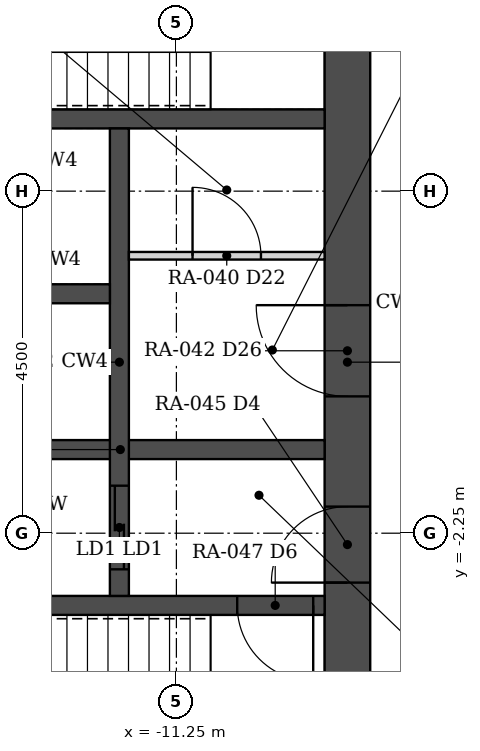
"""IFC4 building model, lengths in metres.
Left out: names, types, materials, properties, quantities, classifications, styles, units other than length and angle.
Written with IfcOpenShell. Run it as: python <this file> out.ifc"""

import sys

from ifc_helpers import new_model, si_unit, direction, frame, frame_2d, origin, place, context, subcontext, project, spatial, rectangle, extrude, element, fill, save


model = new_model("IFC4")
c1 = context("Model", 3, precision=1e-05, world=origin(), true_north=direction((0.0, 1.0)))
c2 = subcontext(c1, "Body", "Model", "MODEL_VIEW")
j1 = project(units=[si_unit("LENGTHUNIT", "METRE"), si_unit("PLANEANGLEUNIT", "RADIAN")], contexts=[c1])
p1 = place(None, origin())
s1 = spatial("IfcSite", under=j1, at=p1, CompositionType="ELEMENT")
p2 = place(p1, origin())
s2 = spatial("IfcBuilding", under=s1, at=p2, CompositionType="ELEMENT")
p3 = place(p2, frame((0.0, 0.0, 30.0)))
s3 = spatial("IfcBuildingStorey", under=s2, at=p3, CompositionType="ELEMENT", Elevation=30.0)
p4 = place(p3, frame((-9.0, -6.45, 0.0), z_axis=(0.0, 0.0, 1.0), x_axis=(0.0, 1.0, 0.0)))
e1 = element("IfcWall", 1, at=p4, inside=s3, PredefinedType="SHEAR", context=c2, shape_type="SweptSolid", body=[
    extrude(rectangle(XDim=12.9, YDim=0.6, at=frame_2d((6.45, 0.0))), origin(), (0.0, 0.0, 1.0), 3.5),
])
p5 = place(p4, frame((3.55, 0.0, 0.0)))
e2 = element("IfcOpeningElement", 2, at=p5, cuts=e1, PredefinedType="OPENING", context=c2, shape_type="SweptSolid", body=[
    extrude(rectangle(XDim=1.0, YDim=2.1, at=frame_2d((0.5, 1.05))), frame((0.0, 0.31, 0.0), z_axis=(0.0, -1.0, 0.0), x_axis=(1.0, 0.0, 0.0)), (0.0, 0.0, 1.0), 0.62),
])
p6 = place(p4, frame((6.0, 0.0, 0.0)))
e3 = element("IfcOpeningElement", 3, at=p6, cuts=e1, PredefinedType="OPENING", context=c2, shape_type="SweptSolid", body=[
    extrude(rectangle(XDim=1.2, YDim=2.1, at=frame_2d((0.6, 1.05))), frame((0.0, 0.31, 0.0), z_axis=(0.0, -1.0, 0.0), x_axis=(1.0, 0.0, 0.0)), (0.0, 0.0, 1.0), 0.62),
])
p7 = place(p4, frame((10.85, 0.0, 0.0)))
e4 = element("IfcOpeningElement", 4, at=p7, cuts=e1, PredefinedType="OPENING", context=c2, shape_type="SweptSolid", body=[
    extrude(rectangle(XDim=1.0, YDim=2.1, at=frame_2d((0.5, 1.05))), frame((0.0, 0.31, 0.0), z_axis=(0.0, -1.0, 0.0), x_axis=(1.0, 0.0, 0.0)), (0.0, 0.0, 1.0), 0.62),
])
p8 = place(p3, frame((-9.3, -3.2, 0.0), z_axis=(0.0, 0.0, 1.0), x_axis=(-1.0, 0.0, 0.0)))
e5 = element("IfcWall", 5, at=p8, inside=s3, PredefinedType="SHEAR", context=c2, shape_type="SweptSolid", body=[
    extrude(rectangle(XDim=8.4, YDim=0.25, at=frame_2d((4.2, 0.0))), origin(), (0.0, 0.0, 1.0), 3.5),
])
p9 = place(p8, frame((0.15, 0.0, 0.0)))
e6 = element("IfcOpeningElement", 6, at=p9, cuts=e5, PredefinedType="OPENING", context=c2, shape_type="SweptSolid", body=[
    extrude(rectangle(XDim=1.0, YDim=2.1, at=frame_2d((0.5, 1.05))), frame((0.0, 0.135, 0.0), z_axis=(0.0, -1.0, 0.0), x_axis=(1.0, 0.0, 0.0)), (0.0, 0.0, 1.0), 0.27),
])
p10 = place(p3, frame((-9.3, 3.2, 0.0), z_axis=(0.0, 0.0, 1.0), x_axis=(-1.0, 0.0, 0.0)))
e7 = element("IfcWall", 7, at=p10, inside=s3, PredefinedType="SHEAR", context=c2, shape_type="SweptSolid", body=[
    extrude(rectangle(XDim=8.4, YDim=0.25, at=frame_2d((4.2, 0.0))), origin(), (0.0, 0.0, 1.0), 3.5),
])
p11 = place(p3, frame((-9.3, -1.15, 0.0), z_axis=(0.0, 0.0, 1.0), x_axis=(-1.0, 0.0, 0.0)))
e8 = element("IfcWall", 8, at=p11, inside=s3, PredefinedType="SHEAR", context=c2, shape_type="SweptSolid", body=[
    extrude(rectangle(XDim=5.375, YDim=0.25, at=frame_2d((2.688, 0.0))), origin(), (0.0, 0.0, 1.0), 3.5),
])
p12 = place(p3, frame((-12.0, -3.075, 0.0), z_axis=(0.0, 0.0, 1.0), x_axis=(0.0, 1.0, 0.0)))
e9 = element("IfcWall", 9, at=p12, inside=s3, PredefinedType="SHEAR", context=c2, shape_type="SweptSolid", body=[
    extrude(rectangle(XDim=6.15, YDim=0.25, at=frame_2d((3.075, 0.0))), origin(), (0.0, 0.0, 1.0), 3.5),
])
p13 = place(p12, frame((0.35, 0.0, 0.0)))
e10 = element("IfcOpeningElement", 10, at=p13, cuts=e9, PredefinedType="OPENING", context=c2, shape_type="SweptSolid", body=[
    extrude(rectangle(XDim=1.1, YDim=2.1, at=frame_2d((0.55, 1.05))), frame((0.0, 0.135, 0.0), z_axis=(0.0, -1.0, 0.0), x_axis=(1.0, 0.0, 0.0)), (0.0, 0.0, 1.0), 0.27),
])
p14 = place(p3, frame((-12.125, 0.9, 0.0), z_axis=(0.0, 0.0, 1.0), x_axis=(-1.0, 0.0, 0.0)))
e11 = element("IfcWall", 11, at=p14, inside=s3, PredefinedType="SHEAR", context=c2, shape_type="SweptSolid", body=[
    extrude(rectangle(XDim=2.55, YDim=0.25, at=frame_2d((1.275, 0.0))), origin(), (0.0, 0.0, 1.0), 3.5),
])
p15 = place(p3, frame((-11.875, 1.4, 0.0), z_axis=(0.0, 0.0, 1.0), x_axis=(1.0, 0.0, 0.0)))
e12 = element("IfcWall", 12, at=p15, inside=s3, PredefinedType="PARTITIONING", context=c2, shape_type="SweptSolid", body=[
    extrude(rectangle(XDim=2.575, YDim=0.1, at=frame_2d((1.288, 0.0))), origin(), (0.0, 0.0, 1.0), 2.373),
])
p16 = place(p15, frame((0.837, 0.0, 0.0)))
e13 = element("IfcOpeningElement", 13, at=p16, cuts=e12, PredefinedType="OPENING", context=c2, shape_type="SweptSolid", body=[
    extrude(rectangle(XDim=0.9, YDim=2.1, at=frame_2d((0.45, 1.05))), frame((0.0, 0.06, 0.0), z_axis=(0.0, -1.0, 0.0), x_axis=(1.0, 0.0, 0.0)), (0.0, 0.0, 1.0), 0.12),
])
p17 = place(p5, origin())
e14 = element("IfcDoor", 14, at=p17, inside=s3, OperationType="SINGLE_SWING_LEFT", PredefinedType="DOOR", context=c2, shape_type="SweptSolid", body=[
    extrude(rectangle(XDim=1.0, YDim=2.1, at=frame_2d((0.5, 1.05))), frame((0.0, 0.025, 0.0), z_axis=(0.0, -1.0, 0.0), x_axis=(1.0, 0.0, 0.0)), (0.0, 0.0, 1.0), 0.05),
])
fill(e2, e14)
p18 = place(p9, origin())
e15 = element("IfcDoor", 15, at=p18, inside=s3, OperationType="SINGLE_SWING_LEFT", PredefinedType="DOOR", context=c2, shape_type="SweptSolid", body=[
    extrude(rectangle(XDim=1.0, YDim=2.1, at=frame_2d((0.5, 1.05))), frame((0.0, 0.025, 0.0), z_axis=(0.0, -1.0, 0.0), x_axis=(1.0, 0.0, 0.0)), (0.0, 0.0, 1.0), 0.05),
])
fill(e6, e15)
p19 = place(p6, origin())
e16 = element("IfcDoor", 16, at=p19, inside=s3, OperationType="SINGLE_SWING_RIGHT", PredefinedType="DOOR", context=c2, shape_type="SweptSolid", body=[
    extrude(rectangle(XDim=1.2, YDim=2.1, at=frame_2d((0.6, 1.05))), frame((0.0, 0.025, 0.0), z_axis=(0.0, -1.0, 0.0), x_axis=(1.0, 0.0, 0.0)), (0.0, 0.0, 1.0), 0.05),
])
fill(e3, e16)
p20 = place(p16, origin())
e17 = element("IfcDoor", 17, at=p20, inside=s3, OperationType="SINGLE_SWING_LEFT", PredefinedType="DOOR", context=c2, shape_type="SweptSolid", body=[
    extrude(rectangle(XDim=0.9, YDim=2.1, at=frame_2d((0.45, 1.05))), frame((0.0, 0.025, 0.0), z_axis=(0.0, -1.0, 0.0), x_axis=(1.0, 0.0, 0.0)), (0.0, 0.0, 1.0), 0.05),
])
fill(e13, e17)
p21 = place(p13, origin())
e18 = element("IfcDoor", 18, at=p21, inside=s3, OperationType="DOUBLE_DOOR_SLIDING", PredefinedType="DOOR", context=c2, shape_type="SweptSolid", body=[
    extrude(rectangle(XDim=1.1, YDim=2.1, at=frame_2d((0.55, 1.05))), frame((0.0, 0.025, 0.0), z_axis=(0.0, -1.0, 0.0), x_axis=(1.0, 0.0, 0.0)), (0.0, 0.0, 1.0), 0.05),
])
fill(e10, e18)
save(model, sys.argv[1])
